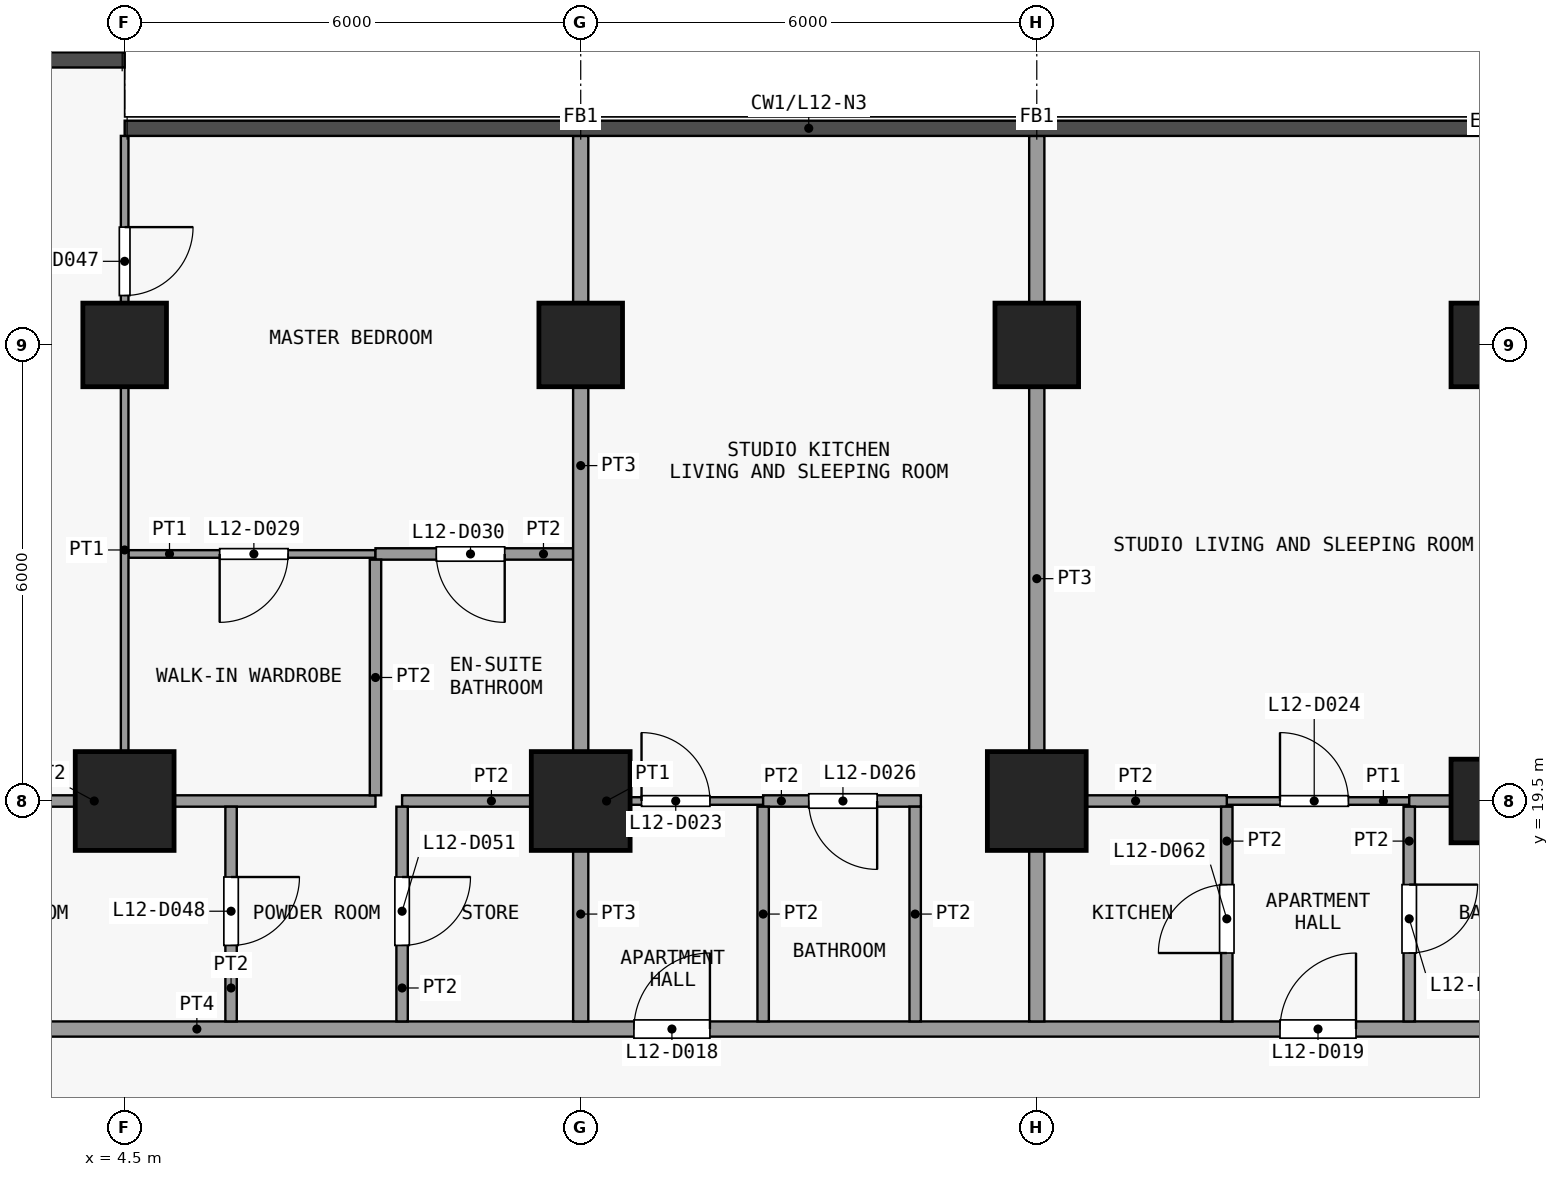
"""IFC4 building model, lengths in metres.
Left out: names, types, materials, properties, quantities, classifications, styles, units other than length and angle.
Written with IfcOpenShell. Run it as: python <this file> out.ifc"""

import sys

from ifc_helpers import new_model, si_unit, direction, frame, frame_2d, origin, origin_2d, place, context, subcontext, project, spatial, rectangle, extrude, element, fill, save


model = new_model("IFC4")
c1 = context("Model", 3, precision=1e-05, world=origin(), true_north=direction((0.0, 1.0)))
c2 = subcontext(c1, "Body", "Model", "MODEL_VIEW")
j1 = project(units=[si_unit("LENGTHUNIT", "METRE"), si_unit("PLANEANGLEUNIT", "RADIAN")], contexts=[c1])
p1 = place(None, origin())
s1 = spatial("IfcSite", under=j1, at=p1, CompositionType="ELEMENT")
p2 = place(p1, origin())
s2 = spatial("IfcBuilding", under=s1, at=p2, CompositionType="ELEMENT")
p3 = place(p2, frame((0.0, 0.0, 54.1)))
s3 = spatial("IfcBuildingStorey", under=s2, at=p3, CompositionType="ELEMENT", Elevation=54.1)
p4 = place(p3, frame((4.5, 19.5, 0.0), z_axis=(0.0, 0.0, 1.0), x_axis=(1.0, 0.0, 0.0)))
e1 = element("IfcColumn", 1, at=p4, inside=s3, PredefinedType="COLUMN", context=c2, shape_type="SweptSolid", body=[
    extrude(rectangle(XDim=1.3, YDim=1.3, at=origin_2d()), origin(), (0.0, 0.0, 1.0), 3.6),
])
p5 = place(p3, frame((4.5, 25.5, 0.0), z_axis=(0.0, 0.0, 1.0), x_axis=(1.0, 0.0, 0.0)))
e2 = element("IfcColumn", 2, at=p5, inside=s3, PredefinedType="COLUMN", context=c2, shape_type="SweptSolid", body=[
    extrude(rectangle(XDim=1.1, YDim=1.1, at=origin_2d()), origin(), (0.0, 0.0, 1.0), 3.6),
])
p6 = place(p3, frame((10.5, 19.5, 0.0), z_axis=(0.0, 0.0, 1.0), x_axis=(1.0, 0.0, 0.0)))
e3 = element("IfcColumn", 3, at=p6, inside=s3, PredefinedType="COLUMN", context=c2, shape_type="SweptSolid", body=[
    extrude(rectangle(XDim=1.3, YDim=1.3, at=origin_2d()), origin(), (0.0, 0.0, 1.0), 3.6),
])
p7 = place(p3, frame((10.5, 25.5, 0.0), z_axis=(0.0, 0.0, 1.0), x_axis=(1.0, 0.0, 0.0)))
e4 = element("IfcColumn", 4, at=p7, inside=s3, PredefinedType="COLUMN", context=c2, shape_type="SweptSolid", body=[
    extrude(rectangle(XDim=1.1, YDim=1.1, at=origin_2d()), origin(), (0.0, 0.0, 1.0), 3.6),
])
p8 = place(p3, frame((16.5, 19.5, 0.0), z_axis=(0.0, 0.0, 1.0), x_axis=(1.0, 0.0, 0.0)))
e5 = element("IfcColumn", 5, at=p8, inside=s3, PredefinedType="COLUMN", context=c2, shape_type="SweptSolid", body=[
    extrude(rectangle(XDim=1.3, YDim=1.3, at=origin_2d()), origin(), (0.0, 0.0, 1.0), 3.6),
])
for number, where, z_axis, x_axis in (
    (6, (16.5, 25.5, 0.0), (0.0, 0.0, 1.0), (1.0, 0.0, 0.0)),
    (7, (22.5, 19.5, 0.0), (0.0, 0.0, 1.0), (1.0, 0.0, 0.0)),
    (8, (22.5, 25.5, 0.0), (0.0, 0.0, 1.0), (1.0, 0.0, 0.0)),
):
    element("IfcColumn", number, at=place(p3, frame(where, z_axis=z_axis, x_axis=x_axis)), inside=s3, PredefinedType="COLUMN", context=c2, shape_type="SweptSolid", body=[
        extrude(rectangle(XDim=1.1, YDim=1.1, at=origin_2d()), origin(), (0.0, 0.0, 1.0), 3.6),
    ])
p9 = place(p3, frame((-25.35, 16.5, 0.0), z_axis=(0.0, 0.0, 1.0), x_axis=(1.0, 0.0, 0.0)))
e9 = element("IfcWall", 9, at=p9, inside=s3, PredefinedType="PARTITIONING", context=c2, shape_type="SweptSolid", body=[
    extrude(rectangle(XDim=49.2, YDim=0.2, at=frame_2d((24.6, 0.0))), origin(), (0.0, 0.0, 1.0), 3.3),
])
p10 = place(p9, frame((7.05, 0.0, 0.0)))
e10 = element("IfcOpeningElement", 10, at=p10, cuts=e9, PredefinedType="OPENING", context=c2, shape_type="SweptSolid", body=[
    extrude(rectangle(XDim=1.0, YDim=2.1, at=frame_2d((0.5, 1.05))), frame((0.0, 0.11, 0.0), z_axis=(0.0, -1.0, 0.0), x_axis=(1.0, 0.0, 0.0)), (0.0, 0.0, 1.0), 0.22),
])
p11 = place(p9, frame((15.55, 0.0, 0.0)))
e11 = element("IfcOpeningElement", 11, at=p11, cuts=e9, PredefinedType="OPENING", context=c2, shape_type="SweptSolid", body=[
    extrude(rectangle(XDim=1.0, YDim=2.1, at=frame_2d((0.5, 1.05))), frame((0.0, 0.11, 0.0), z_axis=(0.0, -1.0, 0.0), x_axis=(1.0, 0.0, 0.0)), (0.0, 0.0, 1.0), 0.22),
])
p12 = place(p9, frame((24.05, 0.0, 0.0)))
e12 = element("IfcOpeningElement", 12, at=p12, cuts=e9, PredefinedType="OPENING", context=c2, shape_type="SweptSolid", body=[
    extrude(rectangle(XDim=1.0, YDim=2.1, at=frame_2d((0.5, 1.05))), frame((0.0, 0.11, 0.0), z_axis=(0.0, -1.0, 0.0), x_axis=(1.0, 0.0, 0.0)), (0.0, 0.0, 1.0), 0.22),
])
p13 = place(p9, frame((36.55, 0.0, 0.0)))
e13 = element("IfcOpeningElement", 13, at=p13, cuts=e9, PredefinedType="OPENING", context=c2, shape_type="SweptSolid", body=[
    extrude(rectangle(XDim=1.0, YDim=2.1, at=frame_2d((0.5, 1.05))), frame((0.0, 0.11, 0.0), z_axis=(0.0, -1.0, 0.0), x_axis=(1.0, 0.0, 0.0)), (0.0, 0.0, 1.0), 0.22),
])
p14 = place(p9, frame((45.05, 0.0, 0.0)))
e14 = element("IfcOpeningElement", 14, at=p14, cuts=e9, PredefinedType="OPENING", context=c2, shape_type="SweptSolid", body=[
    extrude(rectangle(XDim=1.0, YDim=2.1, at=frame_2d((0.5, 1.05))), frame((0.0, 0.11, 0.0), z_axis=(0.0, -1.0, 0.0), x_axis=(1.0, 0.0, 0.0)), (0.0, 0.0, 1.0), 0.22),
])
p15 = place(p3, frame((10.5, 19.5, 0.0), z_axis=(0.0, 0.0, 1.0), x_axis=(1.0, 0.0, 0.0)))
e15 = element("IfcWall", 15, at=p15, inside=s3, PredefinedType="PARTITIONING", context=c2, shape_type="SweptSolid", body=[
    extrude(rectangle(XDim=2.4, YDim=0.1, at=frame_2d((1.2, 0.0))), origin(), (0.0, 0.0, 1.0), 3.3),
])
p16 = place(p15, frame((0.8, 0.0, 0.0)))
e16 = element("IfcOpeningElement", 16, at=p16, cuts=e15, PredefinedType="OPENING", context=c2, shape_type="SweptSolid", body=[
    extrude(rectangle(XDim=0.9, YDim=2.1, at=frame_2d((0.45, 1.05))), frame((0.0, 0.06, 0.0), z_axis=(0.0, -1.0, 0.0), x_axis=(1.0, 0.0, 0.0)), (0.0, 0.0, 1.0), 0.12),
])
p17 = place(p3, frame((19.0, 19.5, 0.0), z_axis=(0.0, 0.0, 1.0), x_axis=(1.0, 0.0, 0.0)))
e17 = element("IfcWall", 17, at=p17, inside=s3, PredefinedType="PARTITIONING", context=c2, shape_type="SweptSolid", body=[
    extrude(rectangle(XDim=2.4, YDim=0.1, at=frame_2d((1.2, 0.0))), origin(), (0.0, 0.0, 1.0), 3.3),
])
p18 = place(p17, frame((0.7, 0.0, 0.0)))
e18 = element("IfcOpeningElement", 18, at=p18, cuts=e17, PredefinedType="OPENING", context=c2, shape_type="SweptSolid", body=[
    extrude(rectangle(XDim=0.9, YDim=2.1, at=frame_2d((0.45, 1.05))), frame((0.0, 0.06, 0.0), z_axis=(0.0, -1.0, 0.0), x_axis=(1.0, 0.0, 0.0)), (0.0, 0.0, 1.0), 0.12),
])
p19 = place(p3, frame((0.4, 19.5, 0.0), z_axis=(0.0, 0.0, 1.0), x_axis=(1.0, 0.0, 0.0)))
e19 = element("IfcWall", 19, at=p19, inside=s3, PredefinedType="PARTITIONING", context=c2, shape_type="SweptSolid", body=[
    extrude(rectangle(XDim=7.4, YDim=0.15, at=frame_2d((3.7, 0.0))), origin(), (0.0, 0.0, 1.0), 3.3),
])
p20 = place(p3, frame((8.15, 19.5, 0.0), z_axis=(0.0, 0.0, 1.0), x_axis=(1.0, 0.0, 0.0)))
e20 = element("IfcWall", 20, at=p20, inside=s3, PredefinedType="PARTITIONING", context=c2, shape_type="SweptSolid", body=[
    extrude(rectangle(XDim=2.35, YDim=0.15, at=frame_2d((1.175, 0.0))), origin(), (0.0, 0.0, 1.0), 3.3),
])
p21 = place(p3, frame((12.9, 19.5, 0.0), z_axis=(0.0, 0.0, 1.0), x_axis=(1.0, 0.0, 0.0)))
e21 = element("IfcWall", 21, at=p21, inside=s3, PredefinedType="PARTITIONING", context=c2, shape_type="SweptSolid", body=[
    extrude(rectangle(XDim=2.075, YDim=0.15, at=frame_2d((1.038, 0.0))), origin(), (0.0, 0.0, 1.0), 3.3),
])
p22 = place(p21, frame((0.6, 0.0, 0.0)))
e22 = element("IfcOpeningElement", 22, at=p22, cuts=e21, PredefinedType="OPENING", context=c2, shape_type="SweptSolid", body=[
    extrude(rectangle(XDim=0.9, YDim=2.1, at=frame_2d((0.45, 1.05))), frame((0.0, 0.085, 0.0), z_axis=(0.0, -1.0, 0.0), x_axis=(1.0, 0.0, 0.0)), (0.0, 0.0, 1.0), 0.17),
])
p23 = place(p3, frame((16.6, 19.5, 0.0), z_axis=(0.0, 0.0, 1.0), x_axis=(1.0, 0.0, 0.0)))
e23 = element("IfcWall", 23, at=p23, inside=s3, PredefinedType="PARTITIONING", context=c2, shape_type="SweptSolid", body=[
    extrude(rectangle(XDim=2.4, YDim=0.15, at=frame_2d((1.2, 0.0))), origin(), (0.0, 0.0, 1.0), 3.3),
])
p24 = place(p3, frame((21.4, 19.5, 0.0), z_axis=(0.0, 0.0, 1.0), x_axis=(1.0, 0.0, 0.0)))
e24 = element("IfcWall", 24, at=p24, inside=s3, PredefinedType="PARTITIONING", context=c2, shape_type="SweptSolid", body=[
    extrude(rectangle(XDim=2.45, YDim=0.15, at=frame_2d((1.225, 0.0))), origin(), (0.0, 0.0, 1.0), 3.3),
])
p25 = place(p3, frame((4.55, 22.75, 0.0), z_axis=(0.0, 0.0, 1.0), x_axis=(1.0, 0.0, 0.0)))
e25 = element("IfcWall", 25, at=p25, inside=s3, PredefinedType="PARTITIONING", context=c2, shape_type="SweptSolid", body=[
    extrude(rectangle(XDim=3.25, YDim=0.1, at=frame_2d((1.625, 0.0))), origin(), (0.0, 0.0, 1.0), 3.3),
])
p26 = place(p25, frame((1.2, 0.0, 0.0)))
e26 = element("IfcOpeningElement", 26, at=p26, cuts=e25, PredefinedType="OPENING", context=c2, shape_type="SweptSolid", body=[
    extrude(rectangle(XDim=0.9, YDim=2.1, at=frame_2d((0.45, 1.05))), frame((0.0, 0.06, 0.0), z_axis=(0.0, -1.0, 0.0), x_axis=(1.0, 0.0, 0.0)), (0.0, 0.0, 1.0), 0.12),
])
p27 = place(p3, frame((7.8, 22.75, 0.0), z_axis=(0.0, 0.0, 1.0), x_axis=(1.0, 0.0, 0.0)))
e27 = element("IfcWall", 27, at=p27, inside=s3, PredefinedType="PARTITIONING", context=c2, shape_type="SweptSolid", body=[
    extrude(rectangle(XDim=2.6, YDim=0.15, at=frame_2d((1.3, 0.0))), origin(), (0.0, 0.0, 1.0), 3.3),
])
p28 = place(p27, frame((0.8, 0.0, 0.0)))
e28 = element("IfcOpeningElement", 28, at=p28, cuts=e27, PredefinedType="OPENING", context=c2, shape_type="SweptSolid", body=[
    extrude(rectangle(XDim=0.9, YDim=2.1, at=frame_2d((0.45, 1.05))), frame((0.0, 0.085, 0.0), z_axis=(0.0, -1.0, 0.0), x_axis=(1.0, 0.0, 0.0)), (0.0, 0.0, 1.0), 0.17),
])
p29 = place(p3, frame((4.5, 19.575, 0.0), z_axis=(0.0, 0.0, 1.0), x_axis=(0.0, 1.0, 0.0)))
e29 = element("IfcWall", 29, at=p29, inside=s3, PredefinedType="PARTITIONING", context=c2, shape_type="SweptSolid", body=[
    extrude(rectangle(XDim=8.675, YDim=0.1, at=frame_2d((4.337, 0.0))), origin(), (0.0, 0.0, 1.0), 3.3),
])
p30 = place(p29, frame((6.575, 0.0, 0.0)))
e30 = element("IfcOpeningElement", 30, at=p30, cuts=e29, PredefinedType="OPENING", context=c2, shape_type="SweptSolid", body=[
    extrude(rectangle(XDim=0.9, YDim=2.1, at=frame_2d((0.45, 1.05))), frame((0.0, 0.06, 0.0), z_axis=(0.0, -1.0, 0.0), x_axis=(1.0, 0.0, 0.0)), (0.0, 0.0, 1.0), 0.12),
])
p31 = place(p3, frame((5.9, 16.6, 0.0), z_axis=(0.0, 0.0, 1.0), x_axis=(0.0, 1.0, 0.0)))
e31 = element("IfcWall", 31, at=p31, inside=s3, PredefinedType="PARTITIONING", context=c2, shape_type="SweptSolid", body=[
    extrude(rectangle(XDim=2.825, YDim=0.15, at=frame_2d((1.413, 0.0))), origin(), (0.0, 0.0, 1.0), 3.3),
])
p32 = place(p31, frame((1.0, 0.0, 0.0)))
e32 = element("IfcOpeningElement", 32, at=p32, cuts=e31, PredefinedType="OPENING", context=c2, shape_type="SweptSolid", body=[
    extrude(rectangle(XDim=0.9, YDim=2.1, at=frame_2d((0.45, 1.05))), frame((0.0, 0.085, 0.0), z_axis=(0.0, -1.0, 0.0), x_axis=(1.0, 0.0, 0.0)), (0.0, 0.0, 1.0), 0.17),
])
p33 = place(p3, frame((7.8, 19.575, 0.0), z_axis=(0.0, 0.0, 1.0), x_axis=(0.0, 1.0, 0.0)))
e33 = element("IfcWall", 33, at=p33, inside=s3, PredefinedType="PARTITIONING", context=c2, shape_type="SweptSolid", body=[
    extrude(rectangle(XDim=3.1, YDim=0.15, at=frame_2d((1.55, 0.0))), origin(), (0.0, 0.0, 1.0), 3.3),
])
p34 = place(p3, frame((8.15, 16.6, 0.0), z_axis=(0.0, 0.0, 1.0), x_axis=(0.0, 1.0, 0.0)))
e34 = element("IfcWall", 34, at=p34, inside=s3, PredefinedType="PARTITIONING", context=c2, shape_type="SweptSolid", body=[
    extrude(rectangle(XDim=2.825, YDim=0.15, at=frame_2d((1.413, 0.0))), origin(), (0.0, 0.0, 1.0), 3.3),
])
p35 = place(p34, frame((1.0, 0.0, 0.0)))
e35 = element("IfcOpeningElement", 35, at=p35, cuts=e34, PredefinedType="OPENING", context=c2, shape_type="SweptSolid", body=[
    extrude(rectangle(XDim=0.9, YDim=2.1, at=frame_2d((0.45, 1.05))), frame((0.0, 0.085, 0.0), z_axis=(0.0, -1.0, 0.0), x_axis=(1.0, 0.0, 0.0)), (0.0, 0.0, 1.0), 0.17),
])
p36 = place(p3, frame((10.5, 16.6, 0.0), z_axis=(0.0, 0.0, 1.0), x_axis=(0.0, 1.0, 0.0)))
e36 = element("IfcWall", 36, at=p36, inside=s3, PredefinedType="PARTITIONING", context=c2, shape_type="SweptSolid", body=[
    extrude(rectangle(XDim=2.825, YDim=0.2, at=frame_2d((1.413, 0.0))), origin(), (0.0, 0.0, 1.0), 3.3),
])
p37 = place(p3, frame((10.5, 19.575, 0.0), z_axis=(0.0, 0.0, 1.0), x_axis=(0.0, 1.0, 0.0)))
e37 = element("IfcWall", 37, at=p37, inside=s3, PredefinedType="PARTITIONING", context=c2, shape_type="SweptSolid", body=[
    extrude(rectangle(XDim=8.675, YDim=0.2, at=frame_2d((4.337, 0.0))), origin(), (0.0, 0.0, 1.0), 3.3),
])
for number, where, z_axis, x_axis in (
    (38, (12.9, 16.6, 0.0), (0.0, 0.0, 1.0), (0.0, 1.0, 0.0)),
    (39, (14.9, 16.6, 0.0), (0.0, 0.0, 1.0), (0.0, 1.0, 0.0)),
):
    element("IfcWall", number, at=place(p3, frame(where, z_axis=z_axis, x_axis=x_axis)), inside=s3, PredefinedType="PARTITIONING", context=c2, shape_type="SweptSolid", body=[
        extrude(rectangle(XDim=2.825, YDim=0.15, at=frame_2d((1.413, 0.0))), origin(), (0.0, 0.0, 1.0), 3.3),
    ])
p38 = place(p3, frame((16.5, 16.6, 0.0), z_axis=(0.0, 0.0, 1.0), x_axis=(0.0, 1.0, 0.0)))
e40 = element("IfcWall", 40, at=p38, inside=s3, PredefinedType="PARTITIONING", context=c2, shape_type="SweptSolid", body=[
    extrude(rectangle(XDim=11.65, YDim=0.2, at=frame_2d((5.825, 0.0))), origin(), (0.0, 0.0, 1.0), 3.3),
])
p39 = place(p3, frame((19.0, 16.6, 0.0), z_axis=(0.0, 0.0, 1.0), x_axis=(0.0, 1.0, 0.0)))
e41 = element("IfcWall", 41, at=p39, inside=s3, PredefinedType="PARTITIONING", context=c2, shape_type="SweptSolid", body=[
    extrude(rectangle(XDim=2.825, YDim=0.15, at=frame_2d((1.413, 0.0))), origin(), (0.0, 0.0, 1.0), 3.3),
])
p40 = place(p39, frame((0.9, 0.0, 0.0)))
e42 = element("IfcOpeningElement", 42, at=p40, cuts=e41, PredefinedType="OPENING", context=c2, shape_type="SweptSolid", body=[
    extrude(rectangle(XDim=0.9, YDim=2.1, at=frame_2d((0.45, 1.05))), frame((0.0, 0.085, 0.0), z_axis=(0.0, -1.0, 0.0), x_axis=(1.0, 0.0, 0.0)), (0.0, 0.0, 1.0), 0.17),
])
p41 = place(p3, frame((21.4, 16.6, 0.0), z_axis=(0.0, 0.0, 1.0), x_axis=(0.0, 1.0, 0.0)))
e43 = element("IfcWall", 43, at=p41, inside=s3, PredefinedType="PARTITIONING", context=c2, shape_type="SweptSolid", body=[
    extrude(rectangle(XDim=2.825, YDim=0.15, at=frame_2d((1.413, 0.0))), origin(), (0.0, 0.0, 1.0), 3.3),
])
p42 = place(p41, frame((0.9, 0.0, 0.0)))
e44 = element("IfcOpeningElement", 44, at=p42, cuts=e43, PredefinedType="OPENING", context=c2, shape_type="SweptSolid", body=[
    extrude(rectangle(XDim=0.9, YDim=2.1, at=frame_2d((0.45, 1.05))), frame((0.0, 0.085, 0.0), z_axis=(0.0, -1.0, 0.0), x_axis=(1.0, 0.0, 0.0)), (0.0, 0.0, 1.0), 0.17),
])
p43 = place(p13, origin())
e45 = element("IfcDoor", 45, at=p43, inside=s3, OperationType="SINGLE_SWING_LEFT", PredefinedType="DOOR", context=c2, shape_type="SweptSolid", body=[
    extrude(rectangle(XDim=1.0, YDim=2.1, at=frame_2d((0.5, 1.05))), frame((0.0, 0.025, 0.0), z_axis=(0.0, -1.0, 0.0), x_axis=(1.0, 0.0, 0.0)), (0.0, 0.0, 1.0), 0.05),
])
fill(e13, e45)
p44 = place(p14, origin())
e46 = element("IfcDoor", 46, at=p44, inside=s3, OperationType="SINGLE_SWING_LEFT", PredefinedType="DOOR", context=c2, shape_type="SweptSolid", body=[
    extrude(rectangle(XDim=1.0, YDim=2.1, at=frame_2d((0.5, 1.05))), frame((0.0, 0.025, 0.0), z_axis=(0.0, -1.0, 0.0), x_axis=(1.0, 0.0, 0.0)), (0.0, 0.0, 1.0), 0.05),
])
fill(e14, e46)
p45 = place(p16, origin())
e47 = element("IfcDoor", 47, at=p45, inside=s3, OperationType="SINGLE_SWING_RIGHT", PredefinedType="DOOR", context=c2, shape_type="SweptSolid", body=[
    extrude(rectangle(XDim=0.9, YDim=2.1, at=frame_2d((0.45, 1.05))), frame((0.0, 0.025, 0.0), z_axis=(0.0, -1.0, 0.0), x_axis=(1.0, 0.0, 0.0)), (0.0, 0.0, 1.0), 0.05),
])
fill(e16, e47)
p46 = place(p18, origin())
e48 = element("IfcDoor", 48, at=p46, inside=s3, OperationType="SINGLE_SWING_RIGHT", PredefinedType="DOOR", context=c2, shape_type="SweptSolid", body=[
    extrude(rectangle(XDim=0.9, YDim=2.1, at=frame_2d((0.45, 1.05))), frame((0.0, 0.025, 0.0), z_axis=(0.0, -1.0, 0.0), x_axis=(1.0, 0.0, 0.0)), (0.0, 0.0, 1.0), 0.05),
])
fill(e18, e48)
p47 = place(p22, origin())
e49 = element("IfcDoor", 49, at=p47, inside=s3, OperationType="SINGLE_SWING_RIGHT", PredefinedType="DOOR", context=c2, shape_type="SweptSolid", body=[
    extrude(rectangle(XDim=0.9, YDim=2.1, at=frame_2d((0.45, 1.05))), frame((0.0, 0.025, 0.0), z_axis=(0.0, -1.0, 0.0), x_axis=(1.0, 0.0, 0.0)), (0.0, 0.0, 1.0), 0.05),
])
fill(e22, e49)
p48 = place(p26, origin())
e50 = element("IfcDoor", 50, at=p48, inside=s3, OperationType="SINGLE_SWING_LEFT", PredefinedType="DOOR", context=c2, shape_type="SweptSolid", body=[
    extrude(rectangle(XDim=0.9, YDim=2.1, at=frame_2d((0.45, 1.05))), frame((0.0, 0.025, 0.0), z_axis=(0.0, -1.0, 0.0), x_axis=(1.0, 0.0, 0.0)), (0.0, 0.0, 1.0), 0.05),
])
fill(e26, e50)
p49 = place(p28, origin())
e51 = element("IfcDoor", 51, at=p49, inside=s3, OperationType="SINGLE_SWING_RIGHT", PredefinedType="DOOR", context=c2, shape_type="SweptSolid", body=[
    extrude(rectangle(XDim=0.9, YDim=2.1, at=frame_2d((0.45, 1.05))), frame((0.0, 0.025, 0.0), z_axis=(0.0, -1.0, 0.0), x_axis=(1.0, 0.0, 0.0)), (0.0, 0.0, 1.0), 0.05),
])
fill(e28, e51)
p50 = place(p30, origin())
e52 = element("IfcDoor", 52, at=p50, inside=s3, OperationType="SINGLE_SWING_RIGHT", PredefinedType="DOOR", context=c2, shape_type="SweptSolid", body=[
    extrude(rectangle(XDim=0.9, YDim=2.1, at=frame_2d((0.45, 1.05))), frame((0.0, 0.025, 0.0), z_axis=(0.0, -1.0, 0.0), x_axis=(1.0, 0.0, 0.0)), (0.0, 0.0, 1.0), 0.05),
])
fill(e30, e52)
p51 = place(p32, origin())
e53 = element("IfcDoor", 53, at=p51, inside=s3, OperationType="SINGLE_SWING_RIGHT", PredefinedType="DOOR", context=c2, shape_type="SweptSolid", body=[
    extrude(rectangle(XDim=0.9, YDim=2.1, at=frame_2d((0.45, 1.05))), frame((0.0, 0.025, 0.0), z_axis=(0.0, -1.0, 0.0), x_axis=(1.0, 0.0, 0.0)), (0.0, 0.0, 1.0), 0.05),
])
fill(e32, e53)
p52 = place(p35, origin())
e54 = element("IfcDoor", 54, at=p52, inside=s3, OperationType="SINGLE_SWING_RIGHT", PredefinedType="DOOR", context=c2, shape_type="SweptSolid", body=[
    extrude(rectangle(XDim=0.9, YDim=2.1, at=frame_2d((0.45, 1.05))), frame((0.0, 0.025, 0.0), z_axis=(0.0, -1.0, 0.0), x_axis=(1.0, 0.0, 0.0)), (0.0, 0.0, 1.0), 0.05),
])
fill(e35, e54)
p53 = place(p40, origin())
e55 = element("IfcDoor", 55, at=p53, inside=s3, OperationType="SINGLE_SWING_RIGHT", PredefinedType="DOOR", context=c2, shape_type="SweptSolid", body=[
    extrude(rectangle(XDim=0.9, YDim=2.1, at=frame_2d((0.45, 1.05))), frame((0.0, 0.025, 0.0), z_axis=(0.0, -1.0, 0.0), x_axis=(1.0, 0.0, 0.0)), (0.0, 0.0, 1.0), 0.05),
])
fill(e42, e55)
p54 = place(p42, origin())
e56 = element("IfcDoor", 56, at=p54, inside=s3, OperationType="SINGLE_SWING_RIGHT", PredefinedType="DOOR", context=c2, shape_type="SweptSolid", body=[
    extrude(rectangle(XDim=0.9, YDim=2.1, at=frame_2d((0.45, 1.05))), frame((0.0, 0.025, 0.0), z_axis=(0.0, -1.0, 0.0), x_axis=(1.0, 0.0, 0.0)), (0.0, 0.0, 1.0), 0.05),
])
fill(e44, e56)
save(model, sys.argv[1])
